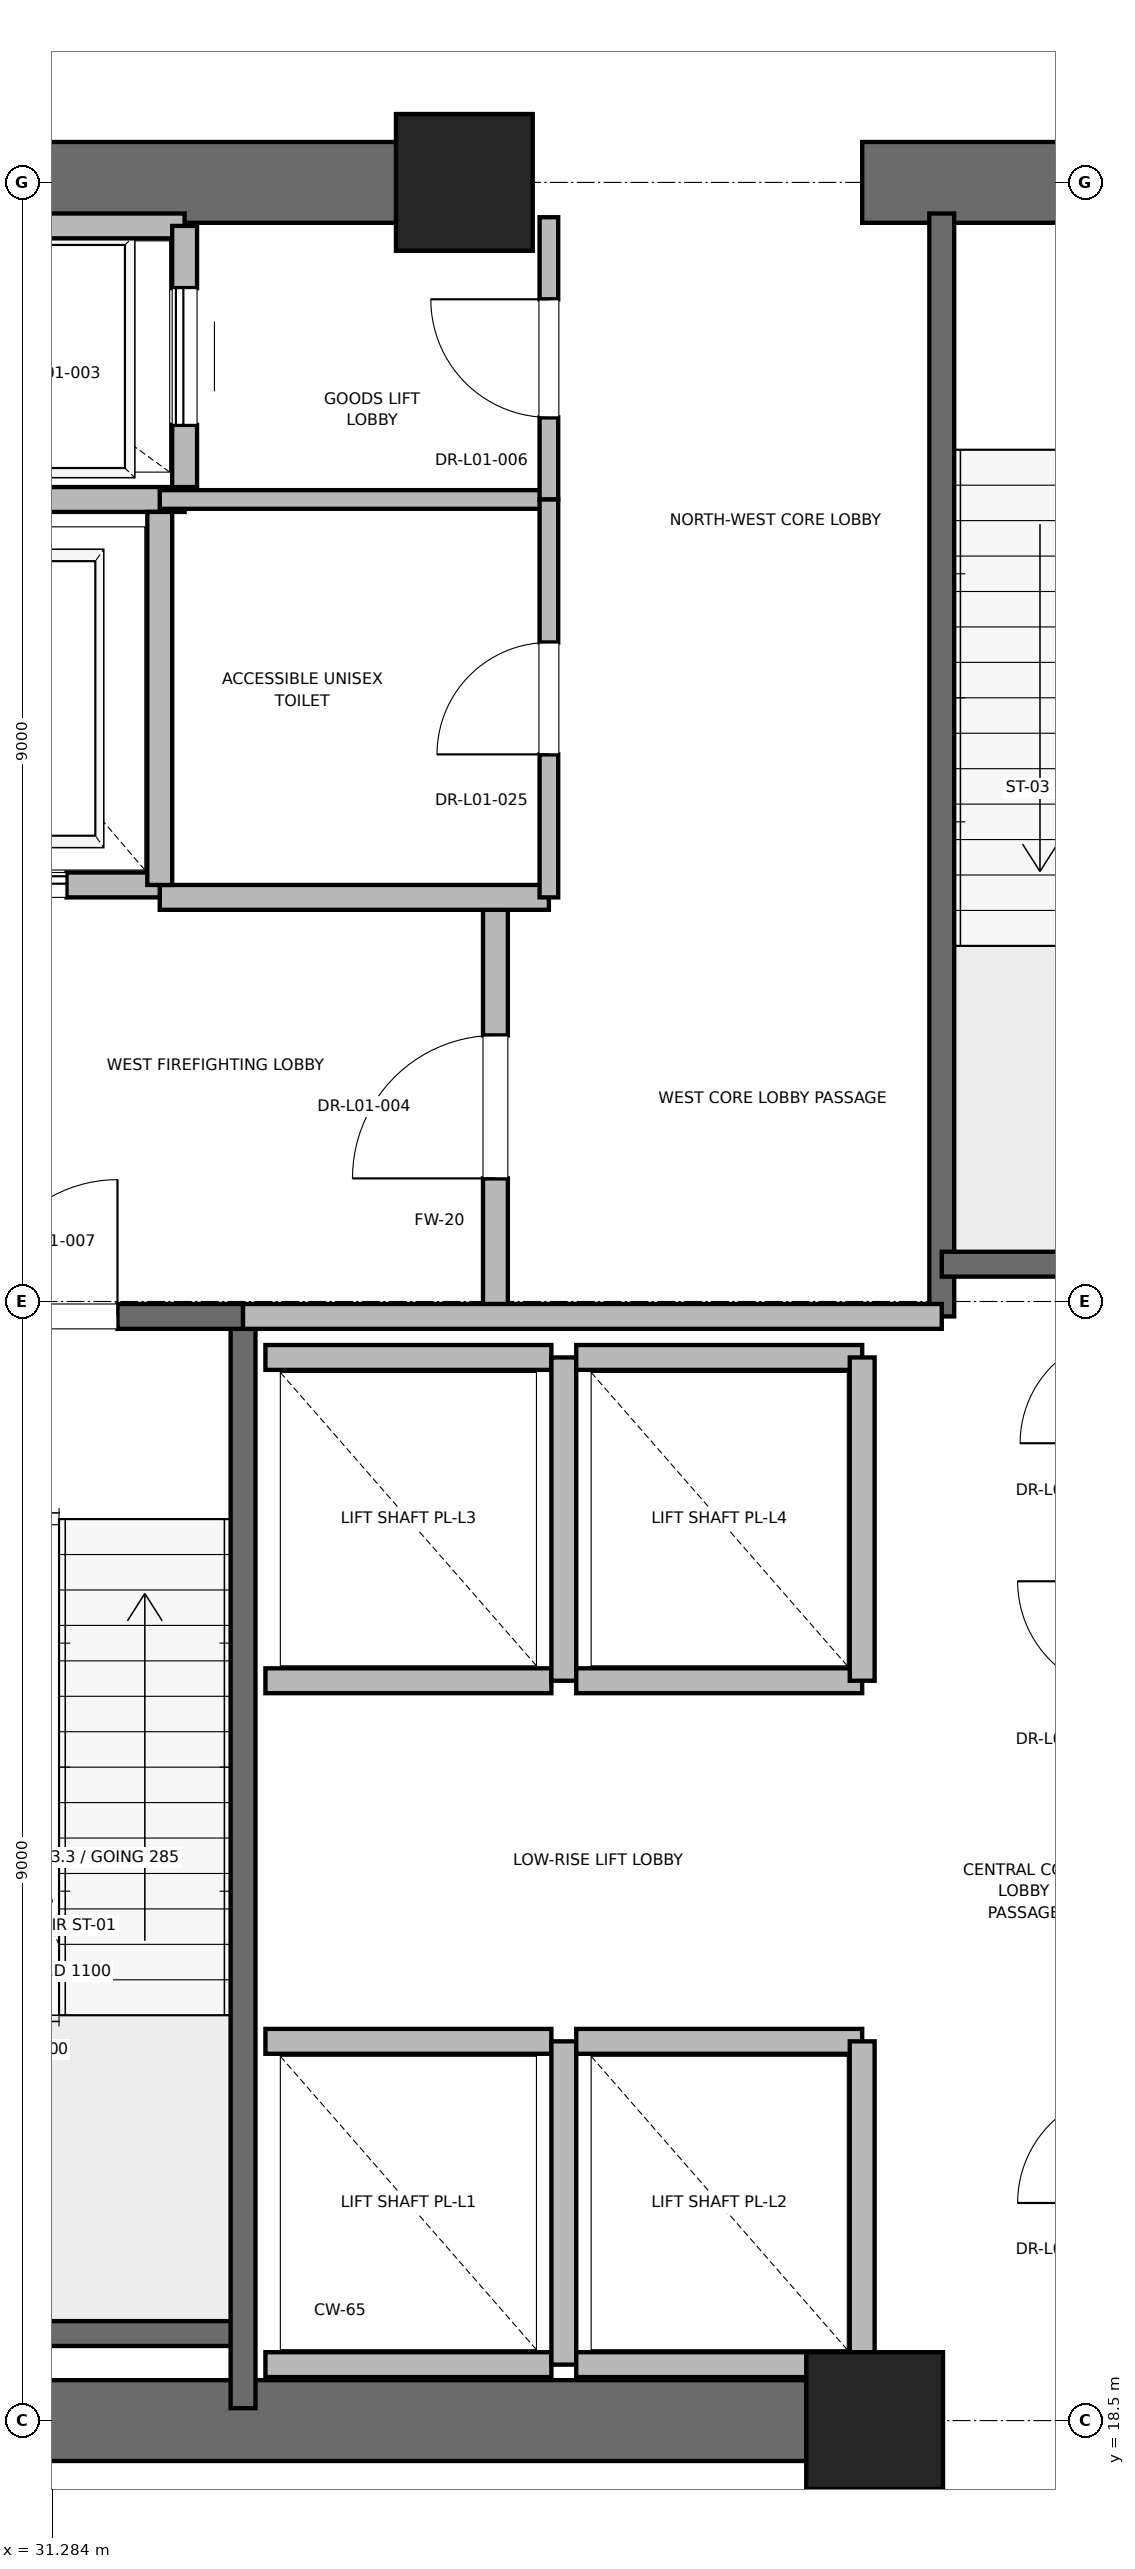
"""IFC4 building model, lengths in metres.
Left out: names, types, materials, properties, quantities, classifications, styles, units other than length and angle.
Written with IfcOpenShell. Run it as: python <this file> out.ifc"""

import sys

from ifc_helpers import new_model, si_unit, direction, frame, frame_2d, origin, origin_2d, place, context, subcontext, project, spatial, rectangle, extrude, element, fill, save


model = new_model("IFC4")
c1 = context("Model", 3, precision=1e-05, world=origin(), true_north=direction((0.0, 1.0)))
c2 = subcontext(c1, "Body", "Model", "MODEL_VIEW")
j1 = project(units=[si_unit("LENGTHUNIT", "METRE"), si_unit("PLANEANGLEUNIT", "RADIAN")], contexts=[c1])
p1 = place(None, origin())
s1 = spatial("IfcSite", under=j1, at=p1, CompositionType="ELEMENT")
p2 = place(p1, origin())
s2 = spatial("IfcBuilding", under=s1, at=p2, CompositionType="ELEMENT")
p3 = place(p2, frame((0.0, 0.0, 6.0)))
s3 = spatial("IfcBuildingStorey", under=s2, at=p3, CompositionType="ELEMENT", Elevation=6.0)
for number, where, z_axis, x_axis in (
    (1, (37.9, 18.5, 0.0), (0.0, 0.0, 1.0), (1.0, 0.0, 0.0)),
    (2, (34.6, 36.5, 0.0), (0.0, 0.0, 1.0), (1.0, 0.0, 0.0)),
):
    element("IfcColumn", number, at=place(p3, frame(where, z_axis=z_axis, x_axis=x_axis)), inside=s3, PredefinedType="PILASTER", context=c2, shape_type="SweptSolid", body=[
        extrude(rectangle(XDim=1.1, YDim=1.1, at=origin_2d()), origin(), (0.0, 0.0, 1.0), 5.2),
    ])
p4 = place(p3, frame((29.0, 18.5, 0.0), z_axis=(0.0, 0.0, 1.0), x_axis=(1.0, 0.0, 0.0)))
e3 = element("IfcWall", 3, at=p4, inside=s3, PredefinedType="SHEAR", context=c2, shape_type="SweptSolid", body=[
    extrude(rectangle(XDim=9.2, YDim=0.65, at=frame_2d((4.6, 0.0))), origin(), (0.0, 0.0, 1.0), 4.92),
])
p5 = place(p3, frame((29.0, 36.5, 0.0), z_axis=(0.0, 0.0, 1.0), x_axis=(1.0, 0.0, 0.0)))
e4 = element("IfcWall", 4, at=p5, inside=s3, PredefinedType="SHEAR", context=c2, shape_type="SweptSolid", body=[
    extrude(rectangle(XDim=5.8, YDim=0.65, at=frame_2d((2.9, 0.0))), origin(), (0.0, 0.0, 1.0), 4.92),
])
p6 = place(p3, frame((37.8, 36.5, 0.0), z_axis=(0.0, 0.0, 1.0), x_axis=(1.0, 0.0, 0.0)))
e5 = element("IfcWall", 5, at=p6, inside=s3, PredefinedType="SHEAR", context=c2, shape_type="SweptSolid", body=[
    extrude(rectangle(XDim=4.4, YDim=0.65, at=frame_2d((2.2, 0.0))), origin(), (0.0, 0.0, 1.0), 4.92),
])
p7 = place(p6, frame((1.65, 0.0, 0.0)))
e6 = element("IfcOpeningElement", 6, at=p7, cuts=e5, PredefinedType="OPENING", context=c2, shape_type="SweptSolid", body=[
    extrude(rectangle(XDim=1.1, YDim=2.15, at=frame_2d((0.55, 1.075))), frame((0.0, 0.325, 0.0), z_axis=(0.0, -1.0, 0.0), x_axis=(1.0, 0.0, 0.0)), (0.0, 0.0, 1.0), 0.65),
])
p8 = place(p3, frame((29.7, 19.2, 0.0), z_axis=(0.0, 0.0, 1.0), x_axis=(1.0, 0.0, 0.0)))
e7 = element("IfcWall", 7, at=p8, inside=s3, PredefinedType="SOLIDWALL", context=c2, shape_type="SweptSolid", body=[
    extrude(rectangle(XDim=3.12, YDim=0.2, at=frame_2d((1.56, 0.0))), origin(), (0.0, 0.0, 1.0), 4.92),
])
p9 = place(p3, frame((32.82, 18.6, 0.0), z_axis=(0.0, 0.0, 1.0), x_axis=(0.0, 1.0, 0.0)))
e8 = element("IfcWall", 8, at=p9, inside=s3, PredefinedType="SOLIDWALL", context=c2, shape_type="SweptSolid", body=[
    extrude(rectangle(XDim=8.78, YDim=0.2, at=frame_2d((4.39, 0.0))), origin(), (0.0, 0.0, 1.0), 4.92),
])
p10 = place(p3, frame((29.7, 27.38, 0.0), z_axis=(0.0, 0.0, 1.0), x_axis=(1.0, 0.0, 0.0)))
e9 = element("IfcWall", 9, at=p10, inside=s3, PredefinedType="SOLIDWALL", context=c2, shape_type="SweptSolid", body=[
    extrude(rectangle(XDim=3.12, YDim=0.2, at=frame_2d((1.56, 0.0))), origin(), (0.0, 0.0, 1.0), 4.92),
])
p11 = place(p10, frame((1.01, 0.0, 0.0)))
e10 = element("IfcOpeningElement", 10, at=p11, cuts=e9, PredefinedType="OPENING", context=c2, shape_type="SweptSolid", body=[
    extrude(rectangle(XDim=1.1, YDim=2.15, at=frame_2d((0.55, 1.075))), frame((0.0, 0.1, 0.0), z_axis=(0.0, -1.0, 0.0), x_axis=(1.0, 0.0, 0.0)), (0.0, 0.0, 1.0), 0.2),
])
p12 = place(p3, frame((38.44, 27.38, 0.0), z_axis=(0.0, 0.0, 1.0), x_axis=(0.0, 1.0, 0.0)))
e11 = element("IfcWall", 11, at=p12, inside=s3, PredefinedType="SOLIDWALL", context=c2, shape_type="SweptSolid", body=[
    extrude(rectangle(XDim=8.87, YDim=0.2, at=frame_2d((4.435, 0.0))), origin(), (0.0, 0.0, 1.0), 4.92),
])
p13 = place(p3, frame((38.44, 27.8, 0.0), z_axis=(0.0, 0.0, 1.0), x_axis=(1.0, 0.0, 0.0)))
e12 = element("IfcWall", 12, at=p13, inside=s3, PredefinedType="SOLIDWALL", context=c2, shape_type="SweptSolid", body=[
    extrude(rectangle(XDim=3.32, YDim=0.2, at=frame_2d((1.66, 0.0))), origin(), (0.0, 0.0, 1.0), 4.92),
])
p14 = place(p3, frame((34.85, 27.38, 0.0), z_axis=(0.0, 0.0, 1.0), x_axis=(0.0, 1.0, 0.0)))
e13 = element("IfcWall", 13, at=p14, inside=s3, PredefinedType="PARTITIONING", context=c2, shape_type="SweptSolid", body=[
    extrude(rectangle(XDim=3.37, YDim=0.2, at=frame_2d((1.685, 0.0))), origin(), (0.0, 0.0, 1.0), 4.92),
])
p15 = place(p14, frame((1.11, 0.0, 0.0)))
e14 = element("IfcOpeningElement", 14, at=p15, cuts=e13, PredefinedType="OPENING", context=c2, shape_type="SweptSolid", body=[
    extrude(rectangle(XDim=1.15, YDim=2.2, at=frame_2d((0.575, 1.1))), frame((0.0, 0.1, 0.0), z_axis=(0.0, -1.0, 0.0), x_axis=(1.0, 0.0, 0.0)), (0.0, 0.0, 1.0), 0.2),
])
p16 = place(p3, frame((32.82, 27.38, 0.0), z_axis=(0.0, 0.0, 1.0), x_axis=(1.0, 0.0, 0.0)))
e15 = element("IfcWall", 15, at=p16, inside=s3, PredefinedType="PARTITIONING", context=c2, shape_type="SweptSolid", body=[
    extrude(rectangle(XDim=5.62, YDim=0.2, at=frame_2d((2.81, 0.0))), origin(), (0.0, 0.0, 1.0), 4.92),
])
p17 = place(p3, frame((32.15, 30.75, 0.0), z_axis=(0.0, 0.0, 1.0), x_axis=(1.0, 0.0, 0.0)))
e16 = element("IfcWall", 16, at=p17, inside=s3, PredefinedType="PARTITIONING", context=c2, shape_type="SweptSolid", body=[
    extrude(rectangle(XDim=3.13, YDim=0.2, at=frame_2d((1.565, 0.0))), origin(), (0.0, 0.0, 1.0), 4.92),
])
p18 = place(p3, frame((29.55, 30.85, 0.0), z_axis=(0.0, 0.0, 1.0), x_axis=(1.0, 0.0, 0.0)))
e17 = element("IfcWall", 17, at=p18, inside=s3, PredefinedType="SOLIDWALL", context=c2, shape_type="SweptSolid", body=[
    extrude(rectangle(XDim=2.6, YDim=0.2, at=frame_2d((1.3, 0.0))), origin(), (0.0, 0.0, 1.0), 3.7),
])
p19 = place(p18, frame((0.75, 0.0, 0.0)))
e18 = element("IfcOpeningElement", 18, at=p19, cuts=e17, PredefinedType="OPENING", context=c2, shape_type="SweptSolid", body=[
    extrude(rectangle(XDim=1.1, YDim=2.2, at=frame_2d((0.55, 1.1))), frame((0.0, 0.1, 0.0), z_axis=(0.0, -1.0, 0.0), x_axis=(1.0, 0.0, 0.0)), (0.0, 0.0, 1.0), 0.2),
])
p20 = place(p3, frame((29.55, 33.95, 0.0), z_axis=(0.0, 0.0, 1.0), x_axis=(1.0, 0.0, 0.0)))
e19 = element("IfcWall", 19, at=p20, inside=s3, PredefinedType="SOLIDWALL", context=c2, shape_type="SweptSolid", body=[
    extrude(rectangle(XDim=2.8, YDim=0.2, at=frame_2d((1.4, 0.0))), origin(), (0.0, 0.0, 1.0), 4.92),
])
p21 = place(p3, frame((32.15, 30.85, 0.0), z_axis=(0.0, 0.0, 1.0), x_axis=(0.0, 1.0, 0.0)))
e20 = element("IfcWall", 20, at=p21, inside=s3, PredefinedType="SOLIDWALL", context=c2, shape_type="SweptSolid", body=[
    extrude(rectangle(XDim=3.0, YDim=0.2, at=frame_2d((1.5, 0.0))), origin(), (0.0, 0.0, 1.0), 4.92),
])
p22 = place(p3, frame((32.35, 36.15, 0.0), z_axis=(0.0, 0.0, 1.0), x_axis=(-1.0, 0.0, 0.0)))
e21 = element("IfcWall", 21, at=p22, inside=s3, PredefinedType="SOLIDWALL", context=c2, shape_type="SweptSolid", body=[
    extrude(rectangle(XDim=2.8, YDim=0.2, at=frame_2d((1.4, 0.0))), origin(), (0.0, 0.0, 1.0), 3.979),
])
p23 = place(p3, frame((32.35, 34.05, 0.0), z_axis=(0.0, 0.0, 1.0), x_axis=(0.0, 1.0, 0.0)))
e22 = element("IfcWall", 22, at=p23, inside=s3, PredefinedType="SOLIDWALL", context=c2, shape_type="SweptSolid", body=[
    extrude(rectangle(XDim=2.1, YDim=0.2, at=frame_2d((1.05, 0.0))), origin(), (0.0, 0.0, 1.0), 4.92),
])
p24 = place(p23, frame((0.5, 0.0, 0.0)))
e23 = element("IfcOpeningElement", 23, at=p24, cuts=e22, PredefinedType="OPENING", context=c2, shape_type="SweptSolid", body=[
    extrude(rectangle(XDim=1.1, YDim=2.2, at=frame_2d((0.55, 1.1))), frame((0.0, 0.1, 0.0), z_axis=(0.0, -1.0, 0.0), x_axis=(1.0, 0.0, 0.0)), (0.0, 0.0, 1.0), 0.2),
])
for number, where, z_axis, x_axis in (
    (24, (33.0, 18.95, 0.0), (0.0, 0.0, 1.0), (1.0, 0.0, 0.0)),
    (25, (35.3, 21.55, 0.0), (0.0, 0.0, 1.0), (-1.0, 0.0, 0.0)),
):
    element("IfcWall", number, at=place(p3, frame(where, z_axis=z_axis, x_axis=x_axis)), inside=s3, PredefinedType="SOLIDWALL", context=c2, shape_type="SweptSolid", body=[
        extrude(rectangle(XDim=2.3, YDim=0.2, at=frame_2d((1.15, 0.0))), origin(), (0.0, 0.0, 1.0), 4.92),
    ])
p25 = place(p3, frame((35.4, 18.95, 0.0), z_axis=(0.0, 0.0, 1.0), x_axis=(0.0, 1.0, 0.0)))
e26 = element("IfcWall", 26, at=p25, inside=s3, PredefinedType="SOLIDWALL", context=c2, shape_type="SweptSolid", body=[
    extrude(rectangle(XDim=2.6, YDim=0.2, at=frame_2d((1.3, 0.0))), origin(), (0.0, 0.0, 1.0), 4.92),
])
p26 = place(p3, frame((35.5, 18.95, 0.0), z_axis=(0.0, 0.0, 1.0), x_axis=(1.0, 0.0, 0.0)))
e27 = element("IfcWall", 27, at=p26, inside=s3, PredefinedType="SOLIDWALL", context=c2, shape_type="SweptSolid", body=[
    extrude(rectangle(XDim=2.3, YDim=0.2, at=frame_2d((1.15, 0.0))), origin(), (0.0, 0.0, 1.0), 3.7),
])
p27 = place(p3, frame((37.8, 21.55, 0.0), z_axis=(0.0, 0.0, 1.0), x_axis=(-1.0, 0.0, 0.0)))
e28 = element("IfcWall", 28, at=p27, inside=s3, PredefinedType="SOLIDWALL", context=c2, shape_type="SweptSolid", body=[
    extrude(rectangle(XDim=2.3, YDim=0.2, at=frame_2d((1.15, 0.0))), origin(), (0.0, 0.0, 1.0), 4.92),
])
p28 = place(p3, frame((37.8, 18.95, 0.0), z_axis=(0.0, 0.0, 1.0), x_axis=(0.0, 1.0, 0.0)))
e29 = element("IfcWall", 29, at=p28, inside=s3, PredefinedType="SOLIDWALL", context=c2, shape_type="SweptSolid", body=[
    extrude(rectangle(XDim=2.6, YDim=0.2, at=frame_2d((1.3, 0.0))), origin(), (0.0, 0.0, 1.0), 3.7),
])
for number, where, z_axis, x_axis in (
    (30, (33.0, 24.45, 0.0), (0.0, 0.0, 1.0), (1.0, 0.0, 0.0)),
    (31, (35.3, 27.05, 0.0), (0.0, 0.0, 1.0), (-1.0, 0.0, 0.0)),
):
    element("IfcWall", number, at=place(p3, frame(where, z_axis=z_axis, x_axis=x_axis)), inside=s3, PredefinedType="SOLIDWALL", context=c2, shape_type="SweptSolid", body=[
        extrude(rectangle(XDim=2.3, YDim=0.2, at=frame_2d((1.15, 0.0))), origin(), (0.0, 0.0, 1.0), 4.92),
    ])
p29 = place(p3, frame((35.4, 24.45, 0.0), z_axis=(0.0, 0.0, 1.0), x_axis=(0.0, 1.0, 0.0)))
e32 = element("IfcWall", 32, at=p29, inside=s3, PredefinedType="SOLIDWALL", context=c2, shape_type="SweptSolid", body=[
    extrude(rectangle(XDim=2.6, YDim=0.2, at=frame_2d((1.3, 0.0))), origin(), (0.0, 0.0, 1.0), 4.92),
])
for number, where, z_axis, x_axis in (
    (33, (35.5, 24.45, 0.0), (0.0, 0.0, 1.0), (1.0, 0.0, 0.0)),
    (34, (37.8, 27.05, 0.0), (0.0, 0.0, 1.0), (-1.0, 0.0, 0.0)),
):
    element("IfcWall", number, at=place(p3, frame(where, z_axis=z_axis, x_axis=x_axis)), inside=s3, PredefinedType="SOLIDWALL", context=c2, shape_type="SweptSolid", body=[
        extrude(rectangle(XDim=2.3, YDim=0.2, at=frame_2d((1.15, 0.0))), origin(), (0.0, 0.0, 1.0), 4.92),
    ])
p30 = place(p3, frame((37.8, 24.45, 0.0), z_axis=(0.0, 0.0, 1.0), x_axis=(0.0, 1.0, 0.0)))
e35 = element("IfcWall", 35, at=p30, inside=s3, PredefinedType="SOLIDWALL", context=c2, shape_type="SweptSolid", body=[
    extrude(rectangle(XDim=2.6, YDim=0.2, at=frame_2d((1.3, 0.0))), origin(), (0.0, 0.0, 1.0), 4.92),
])
p31 = place(p3, frame((32.15, 33.95, 0.0), z_axis=(0.0, 0.0, 1.0), x_axis=(1.0, 0.0, 0.0)))
e36 = element("IfcWall", 36, at=p31, inside=s3, PredefinedType="PARTITIONING", context=c2, shape_type="SweptSolid", body=[
    extrude(rectangle(XDim=3.13, YDim=0.15, at=frame_2d((1.565, 0.0))), origin(), (0.0, 0.0, 1.0), 2.85),
])
p32 = place(p3, frame((35.28, 33.95, 0.0), z_axis=(0.0, 0.0, 1.0), x_axis=(0.0, 1.0, 0.0)))
e37 = element("IfcWall", 37, at=p32, inside=s3, PredefinedType="PARTITIONING", context=c2, shape_type="SweptSolid", body=[
    extrude(rectangle(XDim=2.27, YDim=0.15, at=frame_2d((1.135, 0.0))), origin(), (0.0, 0.0, 1.0), 2.85),
])
p33 = place(p32, frame((0.66, 0.0, 0.0)))
e38 = element("IfcOpeningElement", 38, at=p33, cuts=e37, PredefinedType="OPENING", context=c2, shape_type="SweptSolid", body=[
    extrude(rectangle(XDim=0.95, YDim=2.15, at=frame_2d((0.475, 1.075))), frame((0.0, 0.075, 0.0), z_axis=(0.0, -1.0, 0.0), x_axis=(1.0, 0.0, 0.0)), (0.0, 0.0, 1.0), 0.15),
])
p34 = place(p3, frame((35.28, 30.75, 0.0), z_axis=(0.0, 0.0, 1.0), x_axis=(0.0, 1.0, 0.0)))
e39 = element("IfcWall", 39, at=p34, inside=s3, PredefinedType="PARTITIONING", context=c2, shape_type="SweptSolid", body=[
    extrude(rectangle(XDim=3.2, YDim=0.15, at=frame_2d((1.6, 0.0))), origin(), (0.0, 0.0, 1.0), 2.85),
])
p35 = place(p34, frame((1.15, 0.0, 0.0)))
e40 = element("IfcOpeningElement", 40, at=p35, cuts=e39, PredefinedType="OPENING", context=c2, shape_type="SweptSolid", body=[
    extrude(rectangle(XDim=0.9, YDim=2.1, at=frame_2d((0.45, 1.05))), frame((0.0, 0.075, 0.0), z_axis=(0.0, -1.0, 0.0), x_axis=(1.0, 0.0, 0.0)), (0.0, 0.0, 1.0), 0.15),
])
p36 = place(p11, origin())
e41 = element("IfcDoor", 41, at=p36, inside=s3, OperationType="SINGLE_SWING_RIGHT", PredefinedType="DOOR", context=c2, shape_type="SweptSolid", body=[
    extrude(rectangle(XDim=1.1, YDim=2.15, at=frame_2d((0.55, 1.075))), frame((0.0, 0.025, 0.0), z_axis=(0.0, -1.0, 0.0), x_axis=(1.0, 0.0, 0.0)), (0.0, 0.0, 1.0), 0.05),
])
fill(e10, e41)
p37 = place(p15, origin())
e42 = element("IfcDoor", 42, at=p37, inside=s3, OperationType="SINGLE_SWING_LEFT", PredefinedType="DOOR", context=c2, shape_type="SweptSolid", body=[
    extrude(rectangle(XDim=1.15, YDim=2.2, at=frame_2d((0.575, 1.1))), frame((0.0, 0.025, 0.0), z_axis=(0.0, -1.0, 0.0), x_axis=(1.0, 0.0, 0.0)), (0.0, 0.0, 1.0), 0.05),
])
fill(e14, e42)
p38 = place(p19, origin())
e43 = element("IfcDoor", 43, at=p38, inside=s3, OperationType="SLIDING_TO_RIGHT", PredefinedType="DOOR", context=c2, shape_type="SweptSolid", body=[
    extrude(rectangle(XDim=1.1, YDim=2.2, at=frame_2d((0.55, 1.1))), frame((0.0, 0.025, 0.0), z_axis=(0.0, -1.0, 0.0), x_axis=(1.0, 0.0, 0.0)), (0.0, 0.0, 1.0), 0.05),
])
fill(e18, e43)
p39 = place(p24, origin())
e44 = element("IfcDoor", 44, at=p39, inside=s3, OperationType="SLIDING_TO_RIGHT", PredefinedType="DOOR", context=c2, shape_type="SweptSolid", body=[
    extrude(rectangle(XDim=1.1, YDim=2.2, at=frame_2d((0.55, 1.1))), frame((0.0, 0.025, 0.0), z_axis=(0.0, -1.0, 0.0), x_axis=(1.0, 0.0, 0.0)), (0.0, 0.0, 1.0), 0.05),
])
fill(e23, e44)
p40 = place(p33, origin())
e45 = element("IfcDoor", 45, at=p40, inside=s3, OperationType="SINGLE_SWING_RIGHT", PredefinedType="DOOR", context=c2, shape_type="SweptSolid", body=[
    extrude(rectangle(XDim=0.95, YDim=2.15, at=frame_2d((0.475, 1.075))), frame((0.0, 0.025, 0.0), z_axis=(0.0, -1.0, 0.0), x_axis=(1.0, 0.0, 0.0)), (0.0, 0.0, 1.0), 0.05),
])
fill(e38, e45)
p41 = place(p35, origin())
e46 = element("IfcDoor", 46, at=p41, inside=s3, OperationType="SINGLE_SWING_LEFT", PredefinedType="DOOR", context=c2, shape_type="SweptSolid", body=[
    extrude(rectangle(XDim=0.9, YDim=2.1, at=frame_2d((0.45, 1.05))), frame((0.0, 0.025, 0.0), z_axis=(0.0, -1.0, 0.0), x_axis=(1.0, 0.0, 0.0)), (0.0, 0.0, 1.0), 0.05),
])
fill(e40, e46)
save(model, sys.argv[1])
